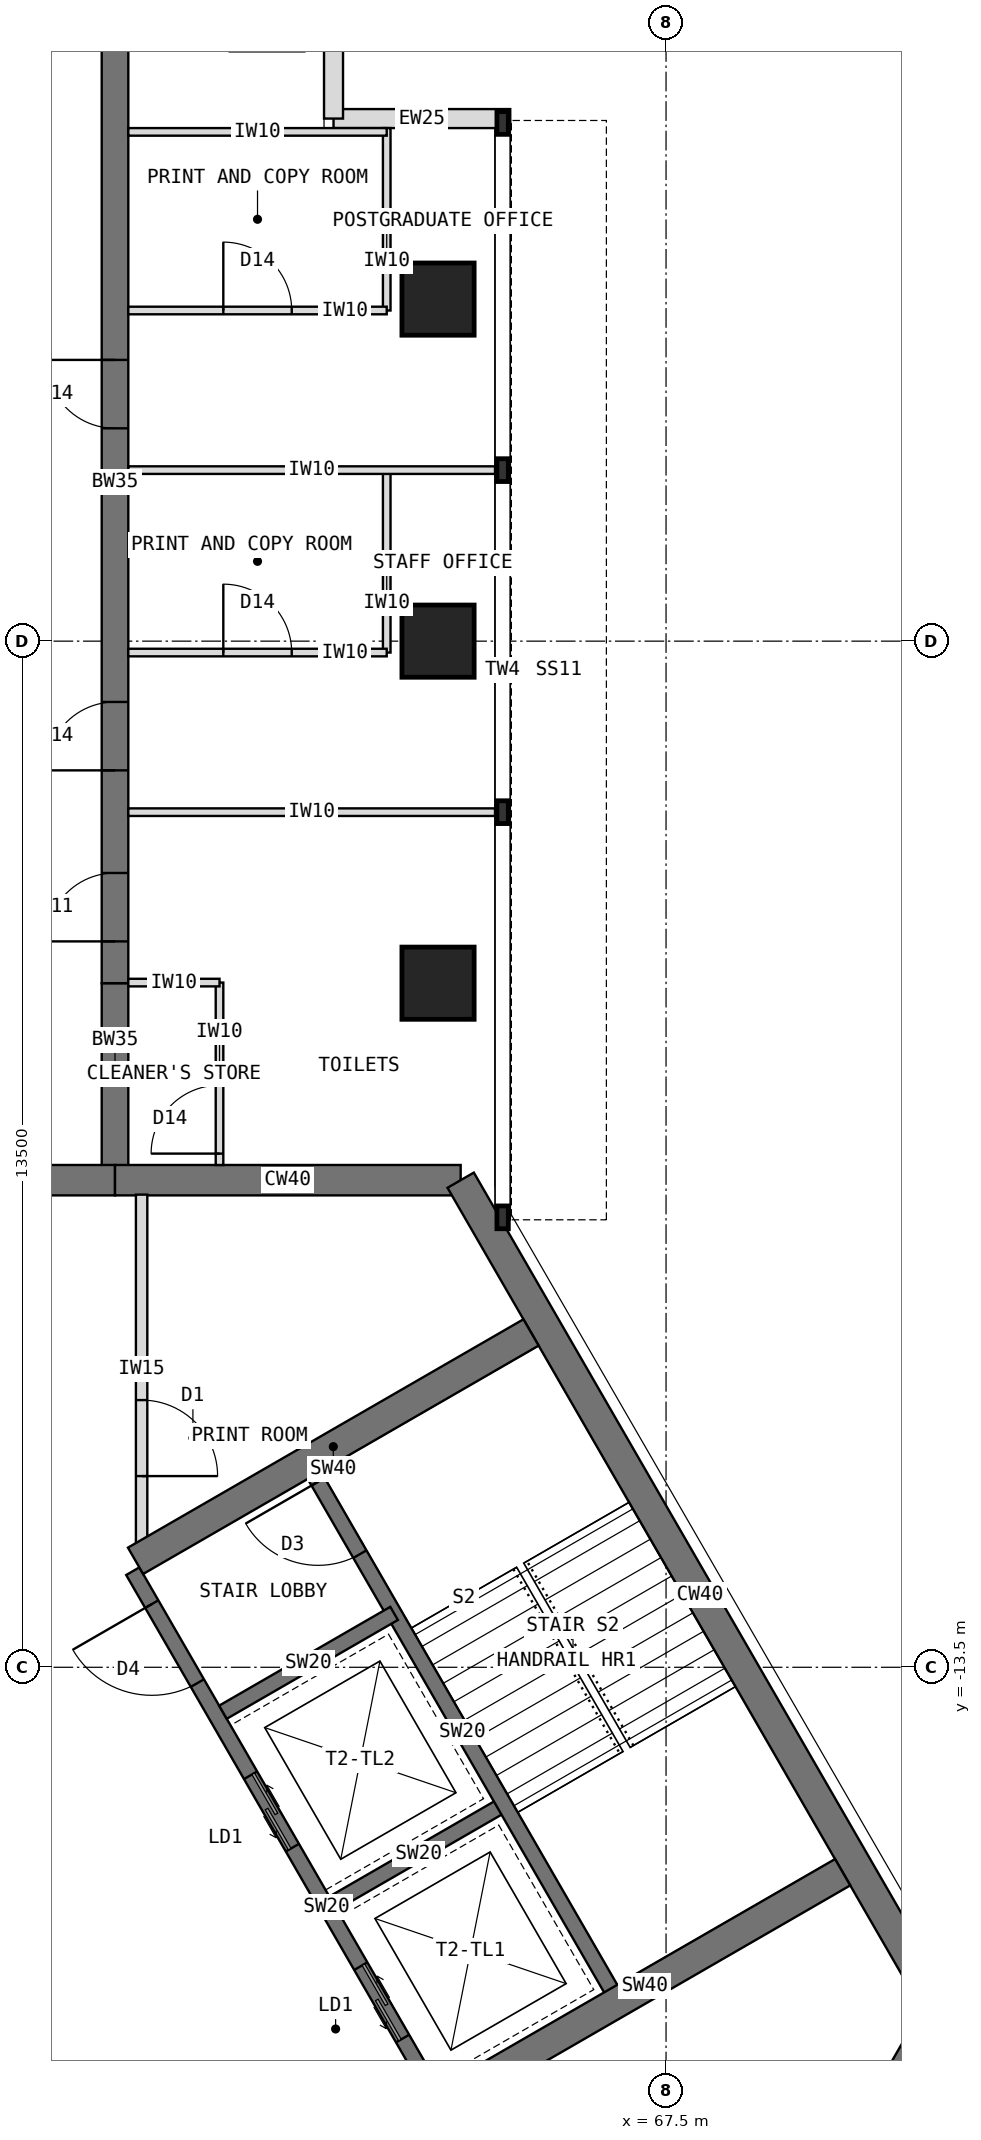
"""IFC4 building model, lengths in metres.
Left out: names, types, materials, properties, quantities, classifications, styles, units other than length and angle.
Written with IfcOpenShell. Run it as: python <this file> out.ifc"""

import sys

from ifc_helpers import new_model, si_unit, direction, frame, frame_2d, origin, origin_2d, place, context, subcontext, project, spatial, rectangle, extrude, element, fill, save


model = new_model("IFC4")
c1 = context("Model", 3, precision=1e-05, world=origin(), true_north=direction((0.0, 1.0)))
c2 = subcontext(c1, "Body", "Model", "MODEL_VIEW")
j1 = project(units=[si_unit("LENGTHUNIT", "METRE"), si_unit("PLANEANGLEUNIT", "RADIAN")], contexts=[c1])
p1 = place(None, origin())
s1 = spatial("IfcSite", under=j1, at=p1, CompositionType="ELEMENT")
p2 = place(p1, origin())
s2 = spatial("IfcBuilding", under=s1, at=p2, CompositionType="ELEMENT")
p3 = place(p2, frame((0.0, 0.0, 287.5)))
s3 = spatial("IfcBuildingStorey", under=s2, at=p3, CompositionType="ELEMENT", Elevation=287.5)
p4 = place(p3, frame((64.798, -7.092, 0.0), z_axis=(0.0, 0.0, 1.0), x_axis=(-1.0, 0.0, 0.0)))
e1 = element("IfcWall", 1, at=p4, inside=s3, PredefinedType="SHEAR", context=c2, shape_type="SweptSolid", body=[
    extrude(rectangle(XDim=4.548, YDim=0.4, at=frame_2d((2.274, 0.0))), origin(), (0.0, 0.0, 1.0), 4.0),
])
p5 = place(p3, frame((60.25, -7.092, 0.0), z_axis=(0.0, 0.0, 1.0), x_axis=(-1.0, 0.0, 0.0)))
e2 = element("IfcWall", 2, at=p5, inside=s3, PredefinedType="SHEAR", context=c2, shape_type="SweptSolid", body=[
    extrude(rectangle(XDim=3.5, YDim=0.4, at=frame_2d((1.75, 0.0))), origin(), (0.0, 0.0, 1.0), 4.0),
])
p6 = place(p5, frame((0.85, 0.0, 0.0)))
e3 = element("IfcOpeningElement", 3, at=p6, cuts=e2, PredefinedType="OPENING", context=c2, shape_type="SweptSolid", body=[
    extrude(rectangle(XDim=1.8, YDim=2.1, at=frame_2d((0.9, 1.05))), frame((0.0, 0.21, 0.0), z_axis=(0.0, -1.0, 0.0), x_axis=(1.0, 0.0, 0.0)), (0.0, 0.0, 1.0), 0.42),
])
p7 = place(p3, frame((68.822, -21.939, 0.0), z_axis=(0.0, 0.0, 1.0), x_axis=(0.500024481964, 0.866011268655, 0.0)))
e4 = element("IfcWall", 4, at=p7, inside=s3, PredefinedType="SHEAR", context=c2, shape_type="SweptSolid", body=[
    extrude(rectangle(XDim=4.548, YDim=0.4, at=frame_2d((2.274, 0.0))), origin(), (0.0, 0.0, 1.0), 4.0),
])
p8 = place(p3, frame((71.096, -18.0, 0.0), z_axis=(0.0, 0.0, 1.0), x_axis=(-0.500005998175, 0.866021940709, 0.0)))
e5 = element("IfcWall", 5, at=p8, inside=s3, PredefinedType="SHEAR", context=c2, shape_type="SweptSolid", body=[
    extrude(rectangle(XDim=12.596, YDim=0.4, at=frame_2d((6.298, 0.0))), origin(), (0.0, 0.0, 1.0), 4.0),
])
p9 = place(p3, frame((60.25, -7.092, 0.0), z_axis=(0.0, 0.0, 1.0), x_axis=(0.0, 1.0, 0.0)))
e6 = element("IfcWall", 6, at=p9, inside=s3, PredefinedType="SHEAR", context=c2, shape_type="SweptSolid", body=[
    extrude(rectangle(XDim=2.592, YDim=0.35, at=frame_2d((1.296, 0.0))), origin(), (0.0, 0.0, 1.0), 4.0),
])
p10 = place(p3, frame((60.25, -4.5, 0.0), z_axis=(0.0, 0.0, 1.0), x_axis=(0.0, 1.0, 0.0)))
e7 = element("IfcWall", 7, at=p10, inside=s3, PredefinedType="SHEAR", context=c2, shape_type="SweptSolid", body=[
    extrude(rectangle(XDim=13.2, YDim=0.35, at=frame_2d((6.6, 0.0))), origin(), (0.0, 0.0, 1.0), 4.0),
])
p11 = place(p10, frame((0.55, 0.0, 0.0)))
e8 = element("IfcOpeningElement", 8, at=p11, cuts=e7, PredefinedType="OPENING", context=c2, shape_type="SweptSolid", body=[
    extrude(rectangle(XDim=0.9, YDim=2.1, at=frame_2d((0.45, 1.05))), frame((0.0, 0.185, 0.0), z_axis=(0.0, -1.0, 0.0), x_axis=(1.0, 0.0, 0.0)), (0.0, 0.0, 1.0), 0.37),
])
p12 = place(p10, frame((2.8, 0.0, 0.0)))
e9 = element("IfcOpeningElement", 9, at=p12, cuts=e7, PredefinedType="OPENING", context=c2, shape_type="SweptSolid", body=[
    extrude(rectangle(XDim=0.9, YDim=2.1, at=frame_2d((0.45, 1.05))), frame((0.0, 0.185, 0.0), z_axis=(0.0, -1.0, 0.0), x_axis=(1.0, 0.0, 0.0)), (0.0, 0.0, 1.0), 0.37),
])
p13 = place(p10, frame((7.3, 0.0, 0.0)))
e10 = element("IfcOpeningElement", 10, at=p13, cuts=e7, PredefinedType="OPENING", context=c2, shape_type="SweptSolid", body=[
    extrude(rectangle(XDim=0.9, YDim=2.1, at=frame_2d((0.45, 1.05))), frame((0.0, 0.185, 0.0), z_axis=(0.0, -1.0, 0.0), x_axis=(1.0, 0.0, 0.0)), (0.0, 0.0, 1.0), 0.37),
])
for number, where, z_axis, x_axis in (
    (11, (64.5, -4.5, 0.0), (0.0, 0.0, 1.0), (1.0, 0.0, 0.0)),
    (12, (64.5, 0.0, 0.0), (0.0, 0.0, 1.0), (1.0, 0.0, 0.0)),
    (13, (64.5, 4.5, 0.0), (0.0, 0.0, 1.0), (1.0, 0.0, 0.0)),
):
    element("IfcColumn", number, at=place(p3, frame(where, z_axis=z_axis, x_axis=x_axis)), inside=s3, PredefinedType="COLUMN", context=c2, shape_type="SweptSolid", body=[
        extrude(rectangle(XDim=0.95, YDim=0.95, at=origin_2d()), origin(), (0.0, 0.0, 1.0), 4.0),
    ])
for number, where, z_axis, x_axis in (
    (14, (65.45, 6.875, 0.0), (0.0, 0.0, 1.0), (-1.0, 0.0, 0.0)),
    (15, (63.125, 6.875, 0.0), (0.0, 0.0, 1.0), (0.0, 1.0, 0.0)),
):
    element("IfcWall", number, at=place(p3, frame(where, z_axis=z_axis, x_axis=x_axis)), inside=s3, PredefinedType="STANDARD", context=c2, shape_type="SweptSolid", body=[
        extrude(rectangle(XDim=2.325, YDim=0.25, at=frame_2d((1.163, 0.0))), origin(), (0.0, 0.0, 1.0), 3.7),
    ])
p14 = place(p3, frame((64.484, -19.164, 0.0), z_axis=(0.0, 0.0, 1.0), x_axis=(-0.49999894854, 0.866026010844, 0.0)))
e16 = element("IfcWall", 16, at=p14, inside=s3, PredefinedType="SHEAR", context=c2, shape_type="SweptSolid", body=[
    extrude(rectangle(XDim=8.0, YDim=0.2, at=frame_2d((4.0, 0.0))), origin(), (0.0, 0.0, 1.0), 4.0),
])
p15 = place(p14, frame((6.3, 0.0, 0.0)))
e17 = element("IfcOpeningElement", 17, at=p15, cuts=e16, PredefinedType="OPENING", context=c2, shape_type="SweptSolid", body=[
    extrude(rectangle(XDim=1.2, YDim=2.1, at=frame_2d((0.6, 1.05))), frame((0.0, 0.11, 0.0), z_axis=(0.0, -1.0, 0.0), x_axis=(1.0, 0.0, 0.0)), (0.0, 0.0, 1.0), 0.22),
])
p16 = place(p14, frame((0.9, 0.0, 0.0)))
e18 = element("IfcOpeningElement", 18, at=p16, cuts=e16, PredefinedType="OPENING", context=c2, shape_type="SweptSolid", body=[
    extrude(rectangle(XDim=1.1, YDim=2.2, at=frame_2d((0.55, 1.1))), frame((0.0, 0.11, 0.0), z_axis=(0.0, -1.0, 0.0), x_axis=(1.0, 0.0, 0.0)), (0.0, 0.0, 1.0), 0.22),
])
p17 = place(p14, frame((3.8, 0.0, 0.0)))
e19 = element("IfcOpeningElement", 19, at=p17, cuts=e16, PredefinedType="OPENING", context=c2, shape_type="SweptSolid", body=[
    extrude(rectangle(XDim=1.1, YDim=2.2, at=frame_2d((0.55, 1.1))), frame((0.0, 0.11, 0.0), z_axis=(0.0, -1.0, 0.0), x_axis=(1.0, 0.0, 0.0)), (0.0, 0.0, 1.0), 0.22),
])
p18 = place(p3, frame((63.12, -16.603, 0.0), z_axis=(0.0, 0.0, 1.0), x_axis=(0.866062058628, 0.499936506574, 0.0)))
e20 = element("IfcWall", 20, at=p18, inside=s3, PredefinedType="SHEAR", context=c2, shape_type="SweptSolid", body=[
    extrude(rectangle(XDim=2.6, YDim=0.2, at=frame_2d((1.3, 0.0))), origin(), (0.0, 0.0, 1.0), 4.0),
])
p19 = place(p3, frame((61.67, -14.091, 0.0), z_axis=(0.0, 0.0, 1.0), x_axis=(0.86603858612, 0.49997716683, 0.0)))
e21 = element("IfcWall", 21, at=p19, inside=s3, PredefinedType="SHEAR", context=c2, shape_type="SweptSolid", body=[
    extrude(rectangle(XDim=2.6, YDim=0.2, at=frame_2d((1.3, 0.0))), origin(), (0.0, 0.0, 1.0), 4.0),
])
p20 = place(p3, frame((66.822, -17.814, 0.0), z_axis=(0.0, 0.0, 1.0), x_axis=(-0.49999894854, 0.866026010844, 0.0)))
e22 = element("IfcWall", 22, at=p20, inside=s3, PredefinedType="SHEAR", context=c2, shape_type="SweptSolid", body=[
    extrude(rectangle(XDim=8.0, YDim=0.2, at=frame_2d((4.0, 0.0))), origin(), (0.0, 0.0, 1.0), 4.0),
])
p21 = place(p20, frame((6.7, 0.0, 0.0)))
e23 = element("IfcOpeningElement", 23, at=p21, cuts=e22, PredefinedType="OPENING", context=c2, shape_type="SweptSolid", body=[
    extrude(rectangle(XDim=1.1, YDim=2.1, at=frame_2d((0.55, 1.05))), frame((0.0, 0.11, 0.0), z_axis=(0.0, -1.0, 0.0), x_axis=(1.0, 0.0, 0.0)), (0.0, 0.0, 1.0), 0.22),
])
for number, where, z_axis, x_axis in (
    (24, (60.52, -12.099, 0.0), (0.0, 0.0, 1.0), (0.866, 0.5, 0.0)),
    (25, (64.62, -19.201, 0.0), (0.0, 0.0, 1.0), (0.866, 0.5, 0.0)),
):
    element("IfcWall", number, at=place(p3, frame(where, z_axis=z_axis, x_axis=x_axis)), inside=s3, PredefinedType="SHEAR", context=c2, shape_type="SweptSolid", body=[
        extrude(rectangle(XDim=6.008, YDim=0.4, at=frame_2d((3.004, 0.0))), origin(), (0.0, 0.0, 1.0), 4.0),
    ])
for number, where, z_axis, x_axis in (
    (26, (60.425, -2.25, 0.0), (0.0, 0.0, 1.0), (1.0, 0.0, 0.0)),
    (27, (60.425, 2.25, 0.0), (0.0, 0.0, 1.0), (1.0, 0.0, 0.0)),
):
    element("IfcWall", number, at=place(p3, frame(where, z_axis=z_axis, x_axis=x_axis)), inside=s3, PredefinedType="PARTITIONING", context=c2, shape_type="SweptSolid", body=[
        extrude(rectangle(XDim=4.825, YDim=0.1, at=frame_2d((2.413, 0.0))), origin(), (0.0, 0.0, 1.0), 3.7),
    ])
p22 = place(p3, frame((63.825, -0.15, 0.0), z_axis=(0.0, 0.0, 1.0), x_axis=(0.0, 1.0, 0.0)))
e28 = element("IfcWall", 28, at=p22, inside=s3, PredefinedType="PARTITIONING", context=c2, shape_type="SweptSolid", body=[
    extrude(rectangle(XDim=2.4, YDim=0.1, at=frame_2d((1.2, 0.0))), origin(), (0.0, 0.0, 1.0), 3.7),
])
p23 = place(p3, frame((60.425, -0.15, 0.0), z_axis=(0.0, 0.0, 1.0), x_axis=(1.0, 0.0, 0.0)))
e29 = element("IfcWall", 29, at=p23, inside=s3, PredefinedType="PARTITIONING", context=c2, shape_type="SweptSolid", body=[
    extrude(rectangle(XDim=3.4, YDim=0.1, at=frame_2d((1.7, 0.0))), origin(), (0.0, 0.0, 1.0), 3.7),
])
p24 = place(p23, frame((1.25, 0.0, 0.0)))
e30 = element("IfcOpeningElement", 30, at=p24, cuts=e29, PredefinedType="OPENING", context=c2, shape_type="SweptSolid", body=[
    extrude(rectangle(XDim=0.9, YDim=2.1, at=frame_2d((0.45, 1.05))), frame((0.0, 0.06, 0.0), z_axis=(0.0, -1.0, 0.0), x_axis=(1.0, 0.0, 0.0)), (0.0, 0.0, 1.0), 0.12),
])
p25 = place(p3, frame((63.825, 4.35, 0.0), z_axis=(0.0, 0.0, 1.0), x_axis=(0.0, 1.0, 0.0)))
e31 = element("IfcWall", 31, at=p25, inside=s3, PredefinedType="PARTITIONING", context=c2, shape_type="SweptSolid", body=[
    extrude(rectangle(XDim=2.4, YDim=0.1, at=frame_2d((1.2, 0.0))), origin(), (0.0, 0.0, 1.0), 3.7),
])
p26 = place(p3, frame((60.425, 4.35, 0.0), z_axis=(0.0, 0.0, 1.0), x_axis=(1.0, 0.0, 0.0)))
e32 = element("IfcWall", 32, at=p26, inside=s3, PredefinedType="PARTITIONING", context=c2, shape_type="SweptSolid", body=[
    extrude(rectangle(XDim=3.4, YDim=0.1, at=frame_2d((1.7, 0.0))), origin(), (0.0, 0.0, 1.0), 3.7),
])
p27 = place(p26, frame((1.25, 0.0, 0.0)))
e33 = element("IfcOpeningElement", 33, at=p27, cuts=e32, PredefinedType="OPENING", context=c2, shape_type="SweptSolid", body=[
    extrude(rectangle(XDim=0.9, YDim=2.1, at=frame_2d((0.45, 1.05))), frame((0.0, 0.06, 0.0), z_axis=(0.0, -1.0, 0.0), x_axis=(1.0, 0.0, 0.0)), (0.0, 0.0, 1.0), 0.12),
])
p28 = place(p3, frame((60.425, 6.7, 0.0), z_axis=(0.0, 0.0, 1.0), x_axis=(1.0, 0.0, 0.0)))
e34 = element("IfcWall", 34, at=p28, inside=s3, PredefinedType="PARTITIONING", context=c2, shape_type="SweptSolid", body=[
    extrude(rectangle(XDim=3.4, YDim=0.1, at=frame_2d((1.7, 0.0))), origin(), (0.0, 0.0, 1.0), 3.7),
])
p29 = place(p3, frame((61.625, -6.892, 0.0), z_axis=(0.0, 0.0, 1.0), x_axis=(0.0, 1.0, 0.0)))
e35 = element("IfcWall", 35, at=p29, inside=s3, PredefinedType="PARTITIONING", context=c2, shape_type="SweptSolid", body=[
    extrude(rectangle(XDim=2.4, YDim=0.1, at=frame_2d((1.2, 0.0))), origin(), (0.0, 0.0, 1.0), 3.7),
])
p30 = place(p29, frame((0.15, 0.0, 0.0)))
e36 = element("IfcOpeningElement", 36, at=p30, cuts=e35, PredefinedType="OPENING", context=c2, shape_type="SweptSolid", body=[
    extrude(rectangle(XDim=0.9, YDim=2.1, at=frame_2d((0.45, 1.05))), frame((0.0, 0.06, 0.0), z_axis=(0.0, -1.0, 0.0), x_axis=(1.0, 0.0, 0.0)), (0.0, 0.0, 1.0), 0.12),
])
p31 = place(p3, frame((60.425, -4.492, 0.0), z_axis=(0.0, 0.0, 1.0), x_axis=(1.0, 0.0, 0.0)))
e37 = element("IfcWall", 37, at=p31, inside=s3, PredefinedType="PARTITIONING", context=c2, shape_type="SweptSolid", body=[
    extrude(rectangle(XDim=1.2, YDim=0.1, at=frame_2d((0.6, 0.0))), origin(), (0.0, 0.0, 1.0), 3.167),
])
p32 = place(p3, frame((60.6, -7.282, 0.0), z_axis=(0.0, 0.0, 1.0), x_axis=(0.0, -1.0, 0.0)))
e38 = element("IfcWall", 38, at=p32, inside=s3, PredefinedType="PARTITIONING", context=c2, shape_type="SweptSolid", body=[
    extrude(rectangle(XDim=4.576, YDim=0.15, at=frame_2d((2.288, 0.0))), origin(), (0.0, 0.0, 1.0), 3.7),
])
p33 = place(p32, frame((2.703, 0.0, 0.0)))
e39 = element("IfcOpeningElement", 39, at=p33, cuts=e38, PredefinedType="OPENING", context=c2, shape_type="SweptSolid", body=[
    extrude(rectangle(XDim=1.0, YDim=2.1, at=frame_2d((0.5, 1.05))), frame((0.0, 0.085, 0.0), z_axis=(0.0, -1.0, 0.0), x_axis=(1.0, 0.0, 0.0)), (0.0, 0.0, 1.0), 0.17),
])
p34 = place(p15, origin())
e40 = element("IfcDoor", 40, at=p34, inside=s3, OperationType="SINGLE_SWING_RIGHT", PredefinedType="DOOR", context=c2, shape_type="SweptSolid", body=[
    extrude(rectangle(XDim=1.2, YDim=2.1, at=frame_2d((0.6, 1.05))), frame((0.0, 0.025, 0.0), z_axis=(0.0, -1.0, 0.0), x_axis=(1.0, 0.0, 0.0)), (0.0, 0.0, 1.0), 0.05),
])
fill(e17, e40)
p35 = place(p16, origin())
e41 = element("IfcDoor", 41, at=p35, inside=s3, OperationType="DOUBLE_DOOR_SLIDING", PredefinedType="DOOR", context=c2, shape_type="SweptSolid", body=[
    extrude(rectangle(XDim=1.1, YDim=2.2, at=frame_2d((0.55, 1.1))), frame((0.0, 0.025, 0.0), z_axis=(0.0, -1.0, 0.0), x_axis=(1.0, 0.0, 0.0)), (0.0, 0.0, 1.0), 0.05),
])
fill(e18, e41)
p36 = place(p17, origin())
e42 = element("IfcDoor", 42, at=p36, inside=s3, OperationType="DOUBLE_DOOR_SLIDING", PredefinedType="DOOR", context=c2, shape_type="SweptSolid", body=[
    extrude(rectangle(XDim=1.1, YDim=2.2, at=frame_2d((0.55, 1.1))), frame((0.0, 0.025, 0.0), z_axis=(0.0, -1.0, 0.0), x_axis=(1.0, 0.0, 0.0)), (0.0, 0.0, 1.0), 0.05),
])
fill(e19, e42)
p37 = place(p21, origin())
e43 = element("IfcDoor", 43, at=p37, inside=s3, OperationType="SINGLE_SWING_RIGHT", PredefinedType="DOOR", context=c2, shape_type="SweptSolid", body=[
    extrude(rectangle(XDim=1.1, YDim=2.1, at=frame_2d((0.55, 1.05))), frame((0.0, 0.025, 0.0), z_axis=(0.0, -1.0, 0.0), x_axis=(1.0, 0.0, 0.0)), (0.0, 0.0, 1.0), 0.05),
])
fill(e23, e43)
p38 = place(p24, origin())
e44 = element("IfcDoor", 44, at=p38, inside=s3, OperationType="SINGLE_SWING_LEFT", PredefinedType="DOOR", context=c2, shape_type="SweptSolid", body=[
    extrude(rectangle(XDim=0.9, YDim=2.1, at=frame_2d((0.45, 1.05))), frame((0.0, 0.025, 0.0), z_axis=(0.0, -1.0, 0.0), x_axis=(1.0, 0.0, 0.0)), (0.0, 0.0, 1.0), 0.05),
])
fill(e30, e44)
p39 = place(p27, origin())
e45 = element("IfcDoor", 45, at=p39, inside=s3, OperationType="SINGLE_SWING_LEFT", PredefinedType="DOOR", context=c2, shape_type="SweptSolid", body=[
    extrude(rectangle(XDim=0.9, YDim=2.1, at=frame_2d((0.45, 1.05))), frame((0.0, 0.025, 0.0), z_axis=(0.0, -1.0, 0.0), x_axis=(1.0, 0.0, 0.0)), (0.0, 0.0, 1.0), 0.05),
])
fill(e33, e45)
p40 = place(p30, origin())
e46 = element("IfcDoor", 46, at=p40, inside=s3, OperationType="SINGLE_SWING_LEFT", PredefinedType="DOOR", context=c2, shape_type="SweptSolid", body=[
    extrude(rectangle(XDim=0.9, YDim=2.1, at=frame_2d((0.45, 1.05))), frame((0.0, 0.025, 0.0), z_axis=(0.0, -1.0, 0.0), x_axis=(1.0, 0.0, 0.0)), (0.0, 0.0, 1.0), 0.05),
])
fill(e36, e46)
p41 = place(p33, origin())
e47 = element("IfcDoor", 47, at=p41, inside=s3, OperationType="SINGLE_SWING_RIGHT", PredefinedType="DOOR", context=c2, shape_type="SweptSolid", body=[
    extrude(rectangle(XDim=1.0, YDim=2.1, at=frame_2d((0.5, 1.05))), frame((0.0, 0.025, 0.0), z_axis=(0.0, -1.0, 0.0), x_axis=(1.0, 0.0, 0.0)), (0.0, 0.0, 1.0), 0.05),
])
fill(e39, e47)
p42 = place(p11, origin())
e48 = element("IfcDoor", 48, at=p42, inside=s3, OperationType="SINGLE_SWING_LEFT", PredefinedType="DOOR", context=c2, shape_type="SweptSolid", body=[
    extrude(rectangle(XDim=0.9, YDim=2.1, at=frame_2d((0.45, 1.05))), frame((0.0, 0.025, 0.0), z_axis=(0.0, -1.0, 0.0), x_axis=(1.0, 0.0, 0.0)), (0.0, 0.0, 1.0), 0.05),
])
fill(e8, e48)
p43 = place(p12, origin())
e49 = element("IfcDoor", 49, at=p43, inside=s3, OperationType="SINGLE_SWING_LEFT", PredefinedType="DOOR", context=c2, shape_type="SweptSolid", body=[
    extrude(rectangle(XDim=0.9, YDim=2.1, at=frame_2d((0.45, 1.05))), frame((0.0, 0.025, 0.0), z_axis=(0.0, -1.0, 0.0), x_axis=(1.0, 0.0, 0.0)), (0.0, 0.0, 1.0), 0.05),
])
fill(e9, e49)
p44 = place(p13, origin())
e50 = element("IfcDoor", 50, at=p44, inside=s3, OperationType="SINGLE_SWING_RIGHT", PredefinedType="DOOR", context=c2, shape_type="SweptSolid", body=[
    extrude(rectangle(XDim=0.9, YDim=2.1, at=frame_2d((0.45, 1.05))), frame((0.0, 0.025, 0.0), z_axis=(0.0, -1.0, 0.0), x_axis=(1.0, 0.0, 0.0)), (0.0, 0.0, 1.0), 0.05),
])
fill(e10, e50)
save(model, sys.argv[1])
